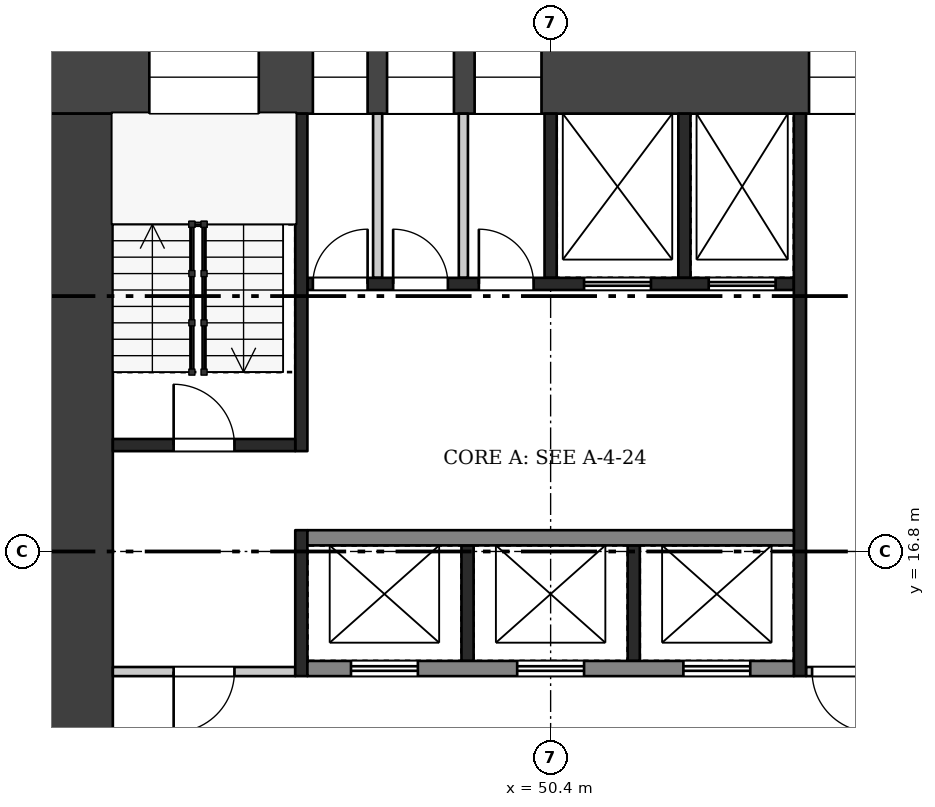
"""IFC4 building model, lengths in metres.
Left out: names, types, materials, properties, quantities, classifications, styles, units other than length and angle.
Written with IfcOpenShell. Run it as: python <this file> out.ifc"""

import sys

from ifc_helpers import new_model, si_unit, direction, frame, frame_2d, origin, place, context, subcontext, project, spatial, rectangle, extrude, element, fill, save


model = new_model("IFC4")
c1 = context("Model", 3, precision=1e-05, world=origin(), true_north=direction((0.0, 1.0)))
c2 = subcontext(c1, "Body", "Model", "MODEL_VIEW")
j1 = project(units=[si_unit("LENGTHUNIT", "METRE"), si_unit("PLANEANGLEUNIT", "RADIAN")], contexts=[c1])
p1 = place(None, origin())
s1 = spatial("IfcSite", under=j1, at=p1, CompositionType="ELEMENT")
p2 = place(p1, origin())
s2 = spatial("IfcBuilding", under=s1, at=p2, CompositionType="ELEMENT")
p3 = place(p2, frame((0.0, 0.0, 158.2)))
s3 = spatial("IfcBuildingStorey", under=s2, at=p3, CompositionType="ELEMENT", Elevation=158.2)
p4 = place(p3, frame((42.0, 24.6, 0.0), z_axis=(0.0, 0.0, 1.0), x_axis=(1.0, 0.0, 0.0)))
e1 = element("IfcWall", 1, at=p4, inside=s3, PredefinedType="SHEAR", context=c2, shape_type="SweptSolid", body=[
    extrude(rectangle(XDim=16.8, YDim=1.2, at=frame_2d((8.4, 0.0))), origin(), (0.0, 0.0, 1.0), 3.22),
])
p5 = place(p4, frame((1.8, 0.0, 0.5)))
e2 = element("IfcOpeningElement", 2, at=p5, cuts=e1, PredefinedType="OPENING", context=c2, shape_type="SweptSolid", body=[
    extrude(rectangle(XDim=1.8, YDim=2.4, at=frame_2d((0.9, 1.2))), frame((0.0, 0.61, 0.0), z_axis=(0.0, -1.0, 0.0), x_axis=(1.0, 0.0, 0.0)), (0.0, 0.0, 1.0), 1.22),
])
p6 = place(p4, frame((4.49, 0.0, 1.6)))
e3 = element("IfcOpeningElement", 3, at=p6, cuts=e1, PredefinedType="OPENING", context=c2, shape_type="SweptSolid", body=[
    extrude(rectangle(XDim=0.9, YDim=1.2, at=frame_2d((0.45, 0.6))), frame((0.0, 0.61, 0.0), z_axis=(0.0, -1.0, 0.0), x_axis=(1.0, 0.0, 0.0)), (0.0, 0.0, 1.0), 1.22),
])
p7 = place(p4, frame((5.71, 0.0, 1.6)))
e4 = element("IfcOpeningElement", 4, at=p7, cuts=e1, PredefinedType="OPENING", context=c2, shape_type="SweptSolid", body=[
    extrude(rectangle(XDim=1.1, YDim=1.2, at=frame_2d((0.55, 0.6))), frame((0.0, 0.61, 0.0), z_axis=(0.0, -1.0, 0.0), x_axis=(1.0, 0.0, 0.0)), (0.0, 0.0, 1.0), 1.22),
])
p8 = place(p4, frame((7.15, 0.0, 1.6)))
e5 = element("IfcOpeningElement", 5, at=p8, cuts=e1, PredefinedType="OPENING", context=c2, shape_type="SweptSolid", body=[
    extrude(rectangle(XDim=1.1, YDim=1.2, at=frame_2d((0.55, 0.6))), frame((0.0, 0.61, 0.0), z_axis=(0.0, -1.0, 0.0), x_axis=(1.0, 0.0, 0.0)), (0.0, 0.0, 1.0), 1.22),
])
p9 = place(p4, frame((12.65, 0.0, 0.6)))
e6 = element("IfcOpeningElement", 6, at=p9, cuts=e1, PredefinedType="OPENING", context=c2, shape_type="SweptSolid", body=[
    extrude(rectangle(XDim=1.0, YDim=2.1, at=frame_2d((0.5, 1.05))), frame((0.0, 0.61, 0.0), z_axis=(0.0, -1.0, 0.0), x_axis=(1.0, 0.0, 0.0)), (0.0, 0.0, 1.0), 1.22),
])
p10 = place(p4, frame((14.175, 0.0, 1.6)))
e7 = element("IfcOpeningElement", 7, at=p10, cuts=e1, PredefinedType="OPENING", context=c2, shape_type="SweptSolid", body=[
    extrude(rectangle(XDim=1.2, YDim=1.2, at=frame_2d((0.6, 0.6))), frame((0.0, 0.61, 0.0), z_axis=(0.0, -1.0, 0.0), x_axis=(1.0, 0.0, 0.0)), (0.0, 0.0, 1.0), 1.22),
])
p11 = place(p3, frame((42.6, 9.6, 0.0), z_axis=(0.0, 0.0, 1.0), x_axis=(0.0, 1.0, 0.0)))
e8 = element("IfcWall", 8, at=p11, inside=s3, PredefinedType="SHEAR", context=c2, shape_type="SweptSolid", body=[
    extrude(rectangle(XDim=14.4, YDim=1.2, at=frame_2d((7.2, 0.0))), origin(), (0.0, 0.0, 1.0), 3.22),
])
p12 = place(p11, frame((2.1, 0.0, 0.0)))
e9 = element("IfcOpeningElement", 9, at=p12, cuts=e8, PredefinedType="OPENING", context=c2, shape_type="SweptSolid", body=[
    extrude(rectangle(XDim=1.8, YDim=2.1, at=frame_2d((0.9, 1.05))), frame((0.0, 0.61, 0.0), z_axis=(0.0, -1.0, 0.0), x_axis=(1.0, 0.0, 0.0)), (0.0, 0.0, 1.0), 1.22),
])
for number, where, z_axis, x_axis in (
    (10, (49.033, 15.0, 0.0), (0.0, 0.0, 1.0), (0.0, 1.0, 0.0)),
    (11, (51.767, 15.0, 0.0), (0.0, 0.0, 1.0), (0.0, 1.0, 0.0)),
):
    element("IfcWall", number, at=place(p3, frame(where, z_axis=z_axis, x_axis=x_axis)), inside=s3, PredefinedType="SHEAR", context=c2, shape_type="SweptSolid", body=[
        extrude(rectangle(XDim=1.9, YDim=0.2, at=frame_2d((0.95, 0.0))), origin(), (0.0, 0.0, 1.0), 3.22),
    ])
p13 = place(p3, frame((46.4, 14.875, 0.0), z_axis=(0.0, 0.0, 1.0), x_axis=(1.0, 0.0, 0.0)))
e12 = element("IfcWall", 12, at=p13, inside=s3, PredefinedType="SHEAR", context=c2, shape_type="SweptSolid", body=[
    extrude(rectangle(XDim=8.0, YDim=0.25, at=frame_2d((4.0, 0.0))), origin(), (0.0, 0.0, 1.0), 3.22),
])
p14 = place(p13, frame((0.717, 0.0, 0.0)))
e13 = element("IfcOpeningElement", 13, at=p14, cuts=e12, PredefinedType="OPENING", context=c2, shape_type="SweptSolid", body=[
    extrude(rectangle(XDim=1.1, YDim=2.1, at=frame_2d((0.55, 1.05))), frame((0.0, 0.135, 0.0), z_axis=(0.0, -1.0, 0.0), x_axis=(1.0, 0.0, 0.0)), (0.0, 0.0, 1.0), 0.27),
])
p15 = place(p13, frame((3.45, 0.0, 0.0)))
e14 = element("IfcOpeningElement", 14, at=p15, cuts=e12, PredefinedType="OPENING", context=c2, shape_type="SweptSolid", body=[
    extrude(rectangle(XDim=1.1, YDim=2.1, at=frame_2d((0.55, 1.05))), frame((0.0, 0.135, 0.0), z_axis=(0.0, -1.0, 0.0), x_axis=(1.0, 0.0, 0.0)), (0.0, 0.0, 1.0), 0.27),
])
p16 = place(p13, frame((6.183, 0.0, 0.0)))
e15 = element("IfcOpeningElement", 15, at=p16, cuts=e12, PredefinedType="OPENING", context=c2, shape_type="SweptSolid", body=[
    extrude(rectangle(XDim=1.1, YDim=2.1, at=frame_2d((0.55, 1.05))), frame((0.0, 0.135, 0.0), z_axis=(0.0, -1.0, 0.0), x_axis=(1.0, 0.0, 0.0)), (0.0, 0.0, 1.0), 0.27),
])
p17 = place(p3, frame((46.4, 17.025, 0.0), z_axis=(0.0, 0.0, 1.0), x_axis=(1.0, 0.0, 0.0)))
e16 = element("IfcWall", 16, at=p17, inside=s3, PredefinedType="SHEAR", context=c2, shape_type="SweptSolid", body=[
    extrude(rectangle(XDim=8.0, YDim=0.25, at=frame_2d((4.0, 0.0))), origin(), (0.0, 0.0, 1.0), 3.22),
])
for number, where, z_axis, x_axis in (
    (17, (50.4, 21.3, 0.0), (0.0, 0.0, 1.0), (0.0, 1.0, 0.0)),
    (18, (52.6, 21.3, 0.0), (0.0, 0.0, 1.0), (0.0, 1.0, 0.0)),
):
    element("IfcWall", number, at=place(p3, frame(where, z_axis=z_axis, x_axis=x_axis)), inside=s3, PredefinedType="SHEAR", context=c2, shape_type="SweptSolid", body=[
        extrude(rectangle(XDim=2.7, YDim=0.2, at=frame_2d((1.35, 0.0))), origin(), (0.0, 0.0, 1.0), 3.22),
    ])
for number, where, z_axis, x_axis in (
    (19, (47.555, 21.3, 0.0), (0.0, 0.0, 1.0), (0.0, 1.0, 0.0)),
    (20, (48.965, 21.3, 0.0), (0.0, 0.0, 1.0), (0.0, 1.0, 0.0)),
):
    element("IfcWall", number, at=place(p3, frame(where, z_axis=z_axis, x_axis=x_axis)), inside=s3, PredefinedType="PARTITIONING", context=c2, shape_type="SweptSolid", body=[
        extrude(rectangle(XDim=2.7, YDim=0.15, at=frame_2d((1.35, 0.0))), origin(), (0.0, 0.0, 1.0), 3.22),
    ])
p18 = place(p3, frame((46.4, 21.2, 0.0), z_axis=(0.0, 0.0, 1.0), x_axis=(1.0, 0.0, 0.0)))
e21 = element("IfcWall", 21, at=p18, inside=s3, PredefinedType="SHEAR", context=c2, shape_type="SweptSolid", body=[
    extrude(rectangle(XDim=8.0, YDim=0.2, at=frame_2d((4.0, 0.0))), origin(), (0.0, 0.0, 1.0), 3.22),
])
p19 = place(p18, frame((0.09, 0.0, 0.0)))
e22 = element("IfcOpeningElement", 22, at=p19, cuts=e21, PredefinedType="OPENING", context=c2, shape_type="SweptSolid", body=[
    extrude(rectangle(XDim=0.9, YDim=2.1, at=frame_2d((0.45, 1.05))), frame((0.0, 0.11, 0.0), z_axis=(0.0, -1.0, 0.0), x_axis=(1.0, 0.0, 0.0)), (0.0, 0.0, 1.0), 0.22),
])
p20 = place(p18, frame((1.41, 0.0, 0.0)))
e23 = element("IfcOpeningElement", 23, at=p20, cuts=e21, PredefinedType="OPENING", context=c2, shape_type="SweptSolid", body=[
    extrude(rectangle(XDim=0.9, YDim=2.1, at=frame_2d((0.45, 1.05))), frame((0.0, 0.11, 0.0), z_axis=(0.0, -1.0, 0.0), x_axis=(1.0, 0.0, 0.0)), (0.0, 0.0, 1.0), 0.22),
])
p21 = place(p18, frame((2.82, 0.0, 0.0)))
e24 = element("IfcOpeningElement", 24, at=p21, cuts=e21, PredefinedType="OPENING", context=c2, shape_type="SweptSolid", body=[
    extrude(rectangle(XDim=0.9, YDim=2.1, at=frame_2d((0.45, 1.05))), frame((0.0, 0.11, 0.0), z_axis=(0.0, -1.0, 0.0), x_axis=(1.0, 0.0, 0.0)), (0.0, 0.0, 1.0), 0.22),
])
p22 = place(p18, frame((4.55, 0.0, 0.0)))
e25 = element("IfcOpeningElement", 25, at=p22, cuts=e21, PredefinedType="OPENING", context=c2, shape_type="SweptSolid", body=[
    extrude(rectangle(XDim=1.1, YDim=2.1, at=frame_2d((0.55, 1.05))), frame((0.0, 0.11, 0.0), z_axis=(0.0, -1.0, 0.0), x_axis=(1.0, 0.0, 0.0)), (0.0, 0.0, 1.0), 0.22),
])
p23 = place(p18, frame((6.6, 0.0, 0.0)))
e26 = element("IfcOpeningElement", 26, at=p23, cuts=e21, PredefinedType="OPENING", context=c2, shape_type="SweptSolid", body=[
    extrude(rectangle(XDim=1.1, YDim=2.1, at=frame_2d((0.55, 1.05))), frame((0.0, 0.11, 0.0), z_axis=(0.0, -1.0, 0.0), x_axis=(1.0, 0.0, 0.0)), (0.0, 0.0, 1.0), 0.22),
])
p24 = place(p3, frame((46.3, 14.75, 0.0), z_axis=(0.0, 0.0, 1.0), x_axis=(0.0, 1.0, 0.0)))
e27 = element("IfcWall", 27, at=p24, inside=s3, PredefinedType="SHEAR", context=c2, shape_type="SweptSolid", body=[
    extrude(rectangle(XDim=2.4, YDim=0.2, at=frame_2d((1.2, 0.0))), origin(), (0.0, 0.0, 1.0), 3.22),
])
p25 = place(p3, frame((46.3, 18.45, 0.0), z_axis=(0.0, 0.0, 1.0), x_axis=(0.0, 1.0, 0.0)))
e28 = element("IfcWall", 28, at=p25, inside=s3, PredefinedType="SHEAR", context=c2, shape_type="SweptSolid", body=[
    extrude(rectangle(XDim=5.55, YDim=0.2, at=frame_2d((2.775, 0.0))), origin(), (0.0, 0.0, 1.0), 3.22),
])
p26 = place(p3, frame((43.2, 14.825, 0.0), z_axis=(0.0, 0.0, 1.0), x_axis=(1.0, 0.0, 0.0)))
e29 = element("IfcWall", 29, at=p26, inside=s3, PredefinedType="PARTITIONING", context=c2, shape_type="SweptSolid", body=[
    extrude(rectangle(XDim=3.0, YDim=0.15, at=frame_2d((1.5, 0.0))), origin(), (0.0, 0.0, 1.0), 3.22),
])
p27 = place(p26, frame((1.0, 0.0, 0.0)))
e30 = element("IfcOpeningElement", 30, at=p27, cuts=e29, PredefinedType="OPENING", context=c2, shape_type="SweptSolid", body=[
    extrude(rectangle(XDim=1.0, YDim=2.1, at=frame_2d((0.5, 1.05))), frame((0.0, 0.085, 0.0), z_axis=(0.0, -1.0, 0.0), x_axis=(1.0, 0.0, 0.0)), (0.0, 0.0, 1.0), 0.17),
])
p28 = place(p3, frame((43.2, 18.55, 0.0), z_axis=(0.0, 0.0, 1.0), x_axis=(1.0, 0.0, 0.0)))
e31 = element("IfcWall", 31, at=p28, inside=s3, PredefinedType="SHEAR", context=c2, shape_type="SweptSolid", body=[
    extrude(rectangle(XDim=3.0, YDim=0.2, at=frame_2d((1.5, 0.0))), origin(), (0.0, 0.0, 1.0), 3.22),
])
p29 = place(p28, frame((1.0, 0.0, 0.0)))
e32 = element("IfcOpeningElement", 32, at=p29, cuts=e31, PredefinedType="OPENING", context=c2, shape_type="SweptSolid", body=[
    extrude(rectangle(XDim=1.0, YDim=2.1, at=frame_2d((0.5, 1.05))), frame((0.0, 0.11, 0.0), z_axis=(0.0, -1.0, 0.0), x_axis=(1.0, 0.0, 0.0)), (0.0, 0.0, 1.0), 0.22),
])
p30 = place(p3, frame((54.5, 14.75, 0.0), z_axis=(0.0, 0.0, 1.0), x_axis=(0.0, 1.0, 0.0)))
e33 = element("IfcWall", 33, at=p30, inside=s3, PredefinedType="SHEAR", context=c2, shape_type="SweptSolid", body=[
    extrude(rectangle(XDim=9.25, YDim=0.2, at=frame_2d((4.625, 0.0))), origin(), (0.0, 0.0, 1.0), 3.22),
])
p31 = place(p3, frame((54.6, 14.825, 0.0), z_axis=(0.0, 0.0, 1.0), x_axis=(1.0, 0.0, 0.0)))
e34 = element("IfcWall", 34, at=p31, inside=s3, PredefinedType="PARTITIONING", context=c2, shape_type="SweptSolid", body=[
    extrude(rectangle(XDim=3.0, YDim=0.15, at=frame_2d((1.5, 0.0))), origin(), (0.0, 0.0, 1.0), 3.22),
])
p32 = place(p31, frame((0.1, 0.0, 0.0)))
e35 = element("IfcOpeningElement", 35, at=p32, cuts=e34, PredefinedType="OPENING", context=c2, shape_type="SweptSolid", body=[
    extrude(rectangle(XDim=1.0, YDim=2.1, at=frame_2d((0.5, 1.05))), frame((0.0, 0.085, 0.0), z_axis=(0.0, -1.0, 0.0), x_axis=(1.0, 0.0, 0.0)), (0.0, 0.0, 1.0), 0.17),
])
p33 = place(p14, origin())
e36 = element("IfcDoor", 36, at=p33, inside=s3, OperationType="DOUBLE_DOOR_SLIDING", PredefinedType="DOOR", context=c2, shape_type="SweptSolid", body=[
    extrude(rectangle(XDim=1.1, YDim=2.1, at=frame_2d((0.55, 1.05))), frame((0.0, 0.025, 0.0), z_axis=(0.0, -1.0, 0.0), x_axis=(1.0, 0.0, 0.0)), (0.0, 0.0, 1.0), 0.05),
])
fill(e13, e36)
p34 = place(p15, origin())
e37 = element("IfcDoor", 37, at=p34, inside=s3, OperationType="DOUBLE_DOOR_SLIDING", PredefinedType="DOOR", context=c2, shape_type="SweptSolid", body=[
    extrude(rectangle(XDim=1.1, YDim=2.1, at=frame_2d((0.55, 1.05))), frame((0.0, 0.025, 0.0), z_axis=(0.0, -1.0, 0.0), x_axis=(1.0, 0.0, 0.0)), (0.0, 0.0, 1.0), 0.05),
])
fill(e14, e37)
p35 = place(p16, origin())
e38 = element("IfcDoor", 38, at=p35, inside=s3, OperationType="DOUBLE_DOOR_SLIDING", PredefinedType="DOOR", context=c2, shape_type="SweptSolid", body=[
    extrude(rectangle(XDim=1.1, YDim=2.1, at=frame_2d((0.55, 1.05))), frame((0.0, 0.025, 0.0), z_axis=(0.0, -1.0, 0.0), x_axis=(1.0, 0.0, 0.0)), (0.0, 0.0, 1.0), 0.05),
])
fill(e15, e38)
p36 = place(p19, origin())
e39 = element("IfcDoor", 39, at=p36, inside=s3, OperationType="SINGLE_SWING_RIGHT", PredefinedType="DOOR", context=c2, shape_type="SweptSolid", body=[
    extrude(rectangle(XDim=0.9, YDim=2.1, at=frame_2d((0.45, 1.05))), frame((0.0, 0.025, 0.0), z_axis=(0.0, -1.0, 0.0), x_axis=(1.0, 0.0, 0.0)), (0.0, 0.0, 1.0), 0.05),
])
fill(e22, e39)
p37 = place(p20, origin())
e40 = element("IfcDoor", 40, at=p37, inside=s3, OperationType="SINGLE_SWING_LEFT", PredefinedType="DOOR", context=c2, shape_type="SweptSolid", body=[
    extrude(rectangle(XDim=0.9, YDim=2.1, at=frame_2d((0.45, 1.05))), frame((0.0, 0.025, 0.0), z_axis=(0.0, -1.0, 0.0), x_axis=(1.0, 0.0, 0.0)), (0.0, 0.0, 1.0), 0.05),
])
fill(e23, e40)
p38 = place(p21, origin())
e41 = element("IfcDoor", 41, at=p38, inside=s3, OperationType="SINGLE_SWING_LEFT", PredefinedType="DOOR", context=c2, shape_type="SweptSolid", body=[
    extrude(rectangle(XDim=0.9, YDim=2.1, at=frame_2d((0.45, 1.05))), frame((0.0, 0.025, 0.0), z_axis=(0.0, -1.0, 0.0), x_axis=(1.0, 0.0, 0.0)), (0.0, 0.0, 1.0), 0.05),
])
fill(e24, e41)
p39 = place(p22, origin())
e42 = element("IfcDoor", 42, at=p39, inside=s3, OperationType="DOUBLE_DOOR_SLIDING", PredefinedType="DOOR", context=c2, shape_type="SweptSolid", body=[
    extrude(rectangle(XDim=1.1, YDim=2.1, at=frame_2d((0.55, 1.05))), frame((0.0, 0.025, 0.0), z_axis=(0.0, -1.0, 0.0), x_axis=(1.0, 0.0, 0.0)), (0.0, 0.0, 1.0), 0.05),
])
fill(e25, e42)
p40 = place(p23, origin())
e43 = element("IfcDoor", 43, at=p40, inside=s3, OperationType="DOUBLE_DOOR_SLIDING", PredefinedType="DOOR", context=c2, shape_type="SweptSolid", body=[
    extrude(rectangle(XDim=1.1, YDim=2.1, at=frame_2d((0.55, 1.05))), frame((0.0, 0.025, 0.0), z_axis=(0.0, -1.0, 0.0), x_axis=(1.0, 0.0, 0.0)), (0.0, 0.0, 1.0), 0.05),
])
fill(e26, e43)
p41 = place(p27, frame((1.0, 0.0, 0.0), z_axis=(0.0, 0.0, 1.0), x_axis=(-1.0, 0.0, 0.0)))
e44 = element("IfcDoor", 44, at=p41, inside=s3, OperationType="SINGLE_SWING_RIGHT", PredefinedType="DOOR", context=c2, shape_type="SweptSolid", body=[
    extrude(rectangle(XDim=1.0, YDim=2.1, at=frame_2d((0.5, 1.05))), frame((0.0, 0.025, 0.0), z_axis=(0.0, -1.0, 0.0), x_axis=(1.0, 0.0, 0.0)), (0.0, 0.0, 1.0), 0.05),
])
fill(e30, e44)
p42 = place(p29, origin())
e45 = element("IfcDoor", 45, at=p42, inside=s3, OperationType="SINGLE_SWING_LEFT", PredefinedType="DOOR", context=c2, shape_type="SweptSolid", body=[
    extrude(rectangle(XDim=1.0, YDim=2.1, at=frame_2d((0.5, 1.05))), frame((0.0, 0.025, 0.0), z_axis=(0.0, -1.0, 0.0), x_axis=(1.0, 0.0, 0.0)), (0.0, 0.0, 1.0), 0.05),
])
fill(e32, e45)
p43 = place(p32, frame((1.0, 0.0, 0.0), z_axis=(0.0, 0.0, 1.0), x_axis=(-1.0, 0.0, 0.0)))
e46 = element("IfcDoor", 46, at=p43, inside=s3, OperationType="SINGLE_SWING_LEFT", PredefinedType="DOOR", context=c2, shape_type="SweptSolid", body=[
    extrude(rectangle(XDim=1.0, YDim=2.1, at=frame_2d((0.5, 1.05))), frame((0.0, 0.025, 0.0), z_axis=(0.0, -1.0, 0.0), x_axis=(1.0, 0.0, 0.0)), (0.0, 0.0, 1.0), 0.05),
])
fill(e35, e46)
p44 = place(p5, origin())
e47 = element("IfcWindow", 47, at=p44, inside=s3, PartitioningType="SINGLE_PANEL", PredefinedType="WINDOW", context=c2, shape_type="SweptSolid", body=[
    extrude(rectangle(XDim=1.8, YDim=2.4, at=frame_2d((0.9, 1.2))), frame((0.0, 0.03, 0.0), z_axis=(0.0, -1.0, 0.0), x_axis=(1.0, 0.0, 0.0)), (0.0, 0.0, 1.0), 0.06),
])
fill(e2, e47)
p45 = place(p6, origin())
e48 = element("IfcWindow", 48, at=p45, inside=s3, PartitioningType="SINGLE_PANEL", PredefinedType="WINDOW", context=c2, shape_type="SweptSolid", body=[
    extrude(rectangle(XDim=0.9, YDim=1.2, at=frame_2d((0.45, 0.6))), frame((0.0, 0.03, 0.0), z_axis=(0.0, -1.0, 0.0), x_axis=(1.0, 0.0, 0.0)), (0.0, 0.0, 1.0), 0.06),
])
fill(e3, e48)
p46 = place(p7, origin())
e49 = element("IfcWindow", 49, at=p46, inside=s3, PartitioningType="SINGLE_PANEL", PredefinedType="WINDOW", context=c2, shape_type="SweptSolid", body=[
    extrude(rectangle(XDim=1.1, YDim=1.2, at=frame_2d((0.55, 0.6))), frame((0.0, 0.03, 0.0), z_axis=(0.0, -1.0, 0.0), x_axis=(1.0, 0.0, 0.0)), (0.0, 0.0, 1.0), 0.06),
])
fill(e4, e49)
p47 = place(p8, origin())
e50 = element("IfcWindow", 50, at=p47, inside=s3, PartitioningType="SINGLE_PANEL", PredefinedType="WINDOW", context=c2, shape_type="SweptSolid", body=[
    extrude(rectangle(XDim=1.1, YDim=1.2, at=frame_2d((0.55, 0.6))), frame((0.0, 0.03, 0.0), z_axis=(0.0, -1.0, 0.0), x_axis=(1.0, 0.0, 0.0)), (0.0, 0.0, 1.0), 0.06),
])
fill(e5, e50)
p48 = place(p9, origin())
e51 = element("IfcWindow", 51, at=p48, inside=s3, PartitioningType="SINGLE_PANEL", PredefinedType="WINDOW", context=c2, shape_type="SweptSolid", body=[
    extrude(rectangle(XDim=1.0, YDim=2.1, at=frame_2d((0.5, 1.05))), frame((0.0, 0.03, 0.0), z_axis=(0.0, -1.0, 0.0), x_axis=(1.0, 0.0, 0.0)), (0.0, 0.0, 1.0), 0.06),
])
fill(e6, e51)
save(model, sys.argv[1])
